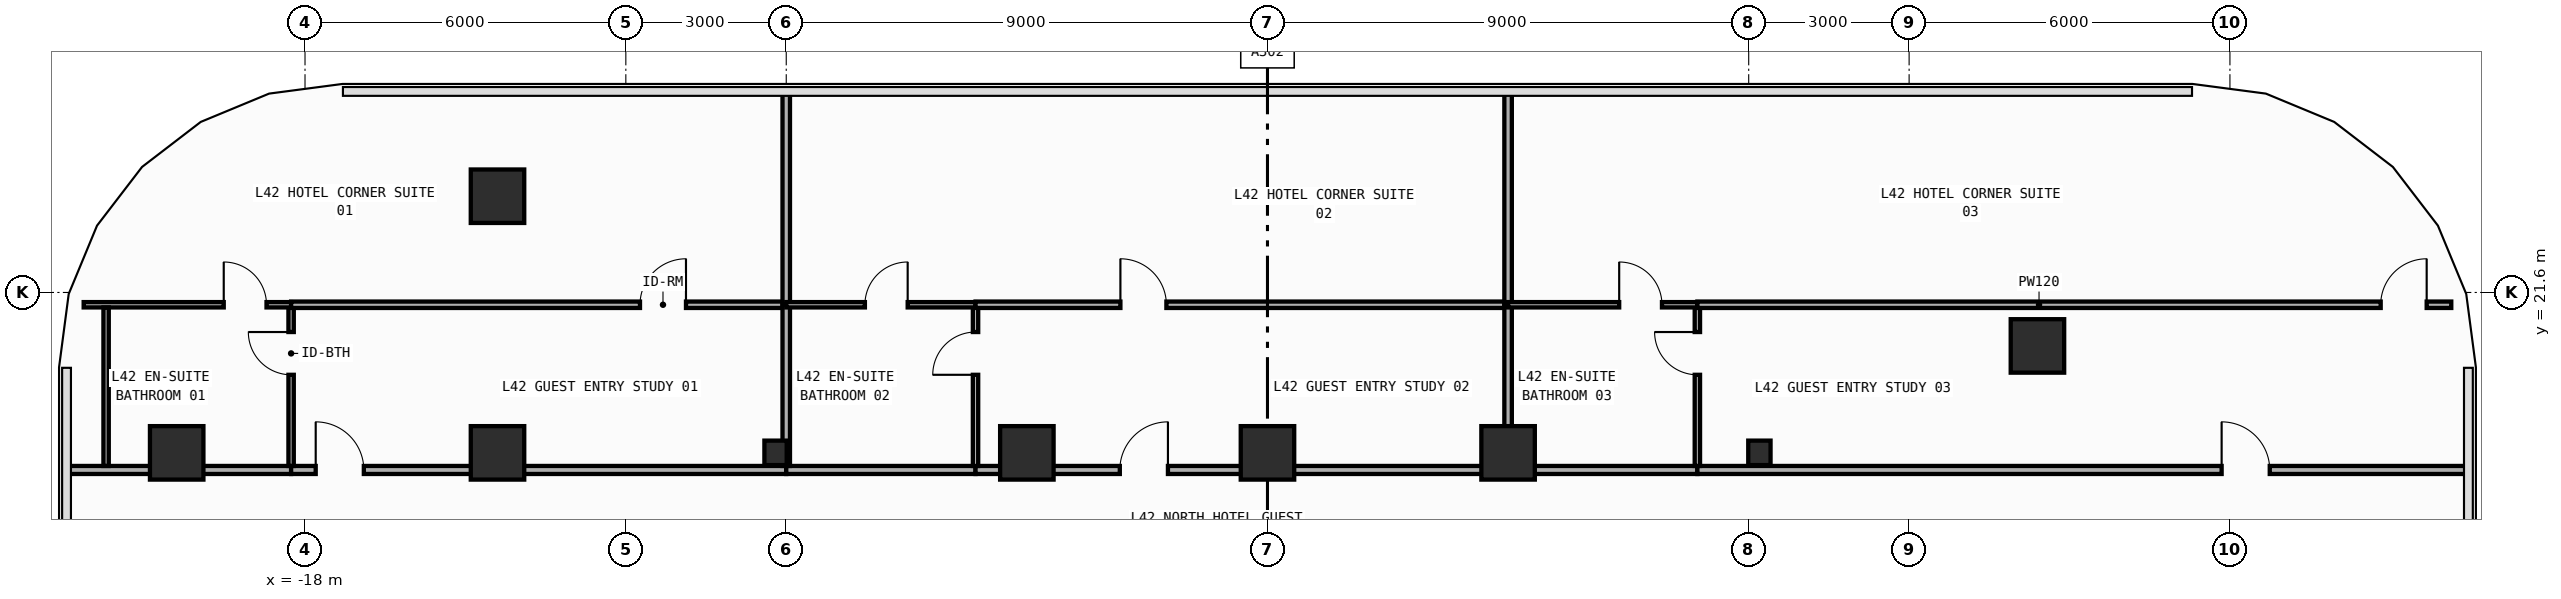
"""IFC4 building model, lengths in metres.
Left out: names, types, materials, properties, quantities, classifications, styles, units other than length and angle.
Written with IfcOpenShell. Run it as: python <this file> out.ifc"""

import sys

from ifc_helpers import new_model, si_unit, direction, frame, frame_2d, origin, origin_2d, place, context, subcontext, project, spatial, rectangle, i_section, extrude, element, fill, save


model = new_model("IFC4")
c1 = context("Model", 3, precision=1e-05, world=origin(), true_north=direction((0.0, 1.0)))
c2 = subcontext(c1, "Body", "Model", "MODEL_VIEW")
j1 = project(units=[si_unit("LENGTHUNIT", "METRE"), si_unit("PLANEANGLEUNIT", "RADIAN")], contexts=[c1])
p1 = place(None, origin())
s1 = spatial("IfcSite", under=j1, at=p1, CompositionType="ELEMENT")
p2 = place(p1, origin())
s2 = spatial("IfcBuilding", under=s1, at=p2, CompositionType="ELEMENT")
p3 = place(p2, frame((0.0, 0.0, 184.0)))
s3 = spatial("IfcBuildingStorey", under=s2, at=p3, CompositionType="ELEMENT", Elevation=184.0)
for number, where, z_axis, x_axis in (
    (1, (-9.2, 18.6, 0.0), (0.0, 0.0, 1.0), (1.0, 0.0, 0.0)),
    (2, (9.2, 18.6, 0.0), (0.0, 0.0, 1.0), (1.0, 0.0, 0.0)),
):
    element("IfcColumn", number, at=place(p3, frame(where, z_axis=z_axis, x_axis=x_axis)), inside=s3, PredefinedType="COLUMN", context=c2, shape_type="SweptSolid", body=[
        extrude(i_section(OverallWidth=0.417, OverallDepth=0.458, WebThickness=0.03, FlangeThickness=0.05, FilletRadius=0.022, at=origin_2d()), origin(), (0.0, 0.0, 1.0), 3.8),
    ])
for number, where, z_axis, x_axis in (
    (3, (-20.4, 18.6, 0.0), (0.0, 0.0, 1.0), (1.0, 0.0, 0.0)),
    (4, (-14.4, 18.6, 0.0), (0.0, 0.0, 1.0), (1.0, 0.0, 0.0)),
    (5, (-4.5, 18.6, 0.0), (0.0, 0.0, 1.0), (1.0, 0.0, 0.0)),
    (6, (0.0, 18.6, 0.0), (0.0, 0.0, 1.0), (1.0, 0.0, 0.0)),
    (7, (4.5, 18.6, 0.0), (0.0, 0.0, 1.0), (1.0, 0.0, 0.0)),
    (8, (-14.4, 23.4, 0.0), (0.0, 0.0, 1.0), (1.0, 0.0, 0.0)),
    (9, (14.4, 20.6, 0.0), (0.0, 0.0, 1.0), (1.0, 0.0, 0.0)),
):
    element("IfcColumn", number, at=place(p3, frame(where, z_axis=z_axis, x_axis=x_axis)), inside=s3, PredefinedType="COLUMN", context=c2, shape_type="SweptSolid", body=[
        extrude(rectangle(XDim=1.0, YDim=1.0, at=origin_2d()), origin(), (0.0, 0.0, 1.0), 3.8),
    ])
p4 = place(p3, frame((-22.455, 18.28, 0.0), z_axis=(0.0, 0.0, 1.0), x_axis=(1.0, 0.0, 0.0)))
e10 = element("IfcWall", 10, at=p4, inside=s3, PredefinedType="PARTITIONING", context=c2, shape_type="SweptSolid", body=[
    extrude(rectangle(XDim=4.195, YDim=0.15, at=frame_2d((2.098, 0.0))), origin(), (0.0, 0.0, 1.0), 2.952),
])
p5 = place(p3, frame((-18.26, 18.28, 0.0), z_axis=(0.0, 0.0, 1.0), x_axis=(1.0, 0.0, 0.0)))
e11 = element("IfcWall", 11, at=p5, inside=s3, PredefinedType="PARTITIONING", context=c2, shape_type="SweptSolid", body=[
    extrude(rectangle(XDim=9.26, YDim=0.15, at=frame_2d((4.63, 0.0))), origin(), (0.0, 0.0, 1.0), 2.952),
])
p6 = place(p5, frame((0.46, 0.0, 0.0)))
e12 = element("IfcOpeningElement", 12, at=p6, cuts=e11, PredefinedType="OPENING", context=c2, shape_type="SweptSolid", body=[
    extrude(rectangle(XDim=0.9, YDim=2.15, at=frame_2d((0.45, 1.075))), frame((0.0, 0.085, 0.0), z_axis=(0.0, -1.0, 0.0), x_axis=(1.0, 0.0, 0.0)), (0.0, 0.0, 1.0), 0.17),
])
p7 = place(p3, frame((-9.0, 18.28, 0.0), z_axis=(0.0, 0.0, 1.0), x_axis=(1.0, 0.0, 0.0)))
e13 = element("IfcWall", 13, at=p7, inside=s3, PredefinedType="PARTITIONING", context=c2, shape_type="SweptSolid", body=[
    extrude(rectangle(XDim=3.54, YDim=0.15, at=frame_2d((1.77, 0.0))), origin(), (0.0, 0.0, 1.0), 2.952),
])
p8 = place(p3, frame((-5.46, 18.28, 0.0), z_axis=(0.0, 0.0, 1.0), x_axis=(1.0, 0.0, 0.0)))
e14 = element("IfcWall", 14, at=p8, inside=s3, PredefinedType="PARTITIONING", context=c2, shape_type="SweptSolid", body=[
    extrude(rectangle(XDim=9.96, YDim=0.15, at=frame_2d((4.98, 0.0))), origin(), (0.0, 0.0, 1.0), 2.952),
])
p9 = place(p8, frame((2.698, 0.0, 0.0)))
e15 = element("IfcOpeningElement", 15, at=p9, cuts=e14, PredefinedType="OPENING", context=c2, shape_type="SweptSolid", body=[
    extrude(rectangle(XDim=0.9, YDim=2.15, at=frame_2d((0.45, 1.075))), frame((0.0, 0.085, 0.0), z_axis=(0.0, -1.0, 0.0), x_axis=(1.0, 0.0, 0.0)), (0.0, 0.0, 1.0), 0.17),
])
p10 = place(p3, frame((4.5, 18.28, 0.0), z_axis=(0.0, 0.0, 1.0), x_axis=(1.0, 0.0, 0.0)))
e16 = element("IfcWall", 16, at=p10, inside=s3, PredefinedType="PARTITIONING", context=c2, shape_type="SweptSolid", body=[
    extrude(rectangle(XDim=3.54, YDim=0.15, at=frame_2d((1.77, 0.0))), origin(), (0.0, 0.0, 1.0), 2.952),
])
p11 = place(p3, frame((8.04, 18.28, 0.0), z_axis=(0.0, 0.0, 1.0), x_axis=(1.0, 0.0, 0.0)))
e17 = element("IfcWall", 17, at=p11, inside=s3, PredefinedType="PARTITIONING", context=c2, shape_type="SweptSolid", body=[
    extrude(rectangle(XDim=14.415, YDim=0.15, at=frame_2d((7.208, 0.0))), origin(), (0.0, 0.0, 1.0), 2.952),
])
p12 = place(p11, frame((9.805, 0.0, 0.0)))
e18 = element("IfcOpeningElement", 18, at=p12, cuts=e17, PredefinedType="OPENING", context=c2, shape_type="SweptSolid", body=[
    extrude(rectangle(XDim=0.9, YDim=2.15, at=frame_2d((0.45, 1.075))), frame((0.0, 0.085, 0.0), z_axis=(0.0, -1.0, 0.0), x_axis=(1.0, 0.0, 0.0)), (0.0, 0.0, 1.0), 0.17),
])
p13 = place(p3, frame((-18.26, 18.355, 0.0), z_axis=(0.0, 0.0, 1.0), x_axis=(0.0, 1.0, 0.0)))
e19 = element("IfcWall", 19, at=p13, inside=s3, PredefinedType="PARTITIONING", context=c2, shape_type="SweptSolid", body=[
    extrude(rectangle(XDim=2.965, YDim=0.1, at=frame_2d((1.482, 0.0))), origin(), (0.0, 0.0, 1.0), 3.54),
])
p14 = place(p13, frame((1.705, 0.0, 0.0)))
e20 = element("IfcOpeningElement", 20, at=p14, cuts=e19, PredefinedType="OPENING", context=c2, shape_type="SweptSolid", body=[
    extrude(rectangle(XDim=0.8, YDim=2.1, at=frame_2d((0.4, 1.05))), frame((0.0, 0.06, 0.0), z_axis=(0.0, -1.0, 0.0), x_axis=(1.0, 0.0, 0.0)), (0.0, 0.0, 1.0), 0.12),
])
p15 = place(p3, frame((-22.14, 21.37, 0.0), z_axis=(0.0, 0.0, 1.0), x_axis=(1.0, 0.0, 0.0)))
e21 = element("IfcWall", 21, at=p15, inside=s3, PredefinedType="PARTITIONING", context=c2, shape_type="SweptSolid", body=[
    extrude(rectangle(XDim=3.88, YDim=0.1, at=frame_2d((1.94, 0.0))), origin(), (0.0, 0.0, 1.0), 3.54),
])
p16 = place(p15, frame((2.62, 0.0, 0.0)))
e22 = element("IfcOpeningElement", 22, at=p16, cuts=e21, PredefinedType="OPENING", context=c2, shape_type="SweptSolid", body=[
    extrude(rectangle(XDim=0.8, YDim=2.1, at=frame_2d((0.4, 1.05))), frame((0.0, 0.06, 0.0), z_axis=(0.0, -1.0, 0.0), x_axis=(1.0, 0.0, 0.0)), (0.0, 0.0, 1.0), 0.12),
])
p17 = place(p3, frame((-18.26, 21.37, 0.0), z_axis=(0.0, 0.0, 1.0), x_axis=(1.0, 0.0, 0.0)))
e23 = element("IfcWall", 23, at=p17, inside=s3, PredefinedType="PARTITIONING", context=c2, shape_type="SweptSolid", body=[
    extrude(rectangle(XDim=9.26, YDim=0.12, at=frame_2d((4.63, 0.0))), origin(), (0.0, 0.0, 1.0), 3.54),
])
p18 = place(p17, frame((6.525, 0.0, 0.0)))
e24 = element("IfcOpeningElement", 24, at=p18, cuts=e23, PredefinedType="OPENING", context=c2, shape_type="SweptSolid", body=[
    extrude(rectangle(XDim=0.86, YDim=2.15, at=frame_2d((0.43, 1.075))), frame((0.0, 0.07, 0.0), z_axis=(0.0, -1.0, 0.0), x_axis=(1.0, 0.0, 0.0)), (0.0, 0.0, 1.0), 0.14),
])
p19 = place(p3, frame((-9.0, 18.355, 0.0), z_axis=(0.0, 0.0, 1.0), x_axis=(0.0, 1.0, 0.0)))
e25 = element("IfcWall", 25, at=p19, inside=s3, PredefinedType="PARTITIONING", context=c2, shape_type="SweptSolid", body=[
    extrude(rectangle(XDim=3.015, YDim=0.14, at=frame_2d((1.508, 0.0))), origin(), (0.0, 0.0, 1.0), 2.952),
])
p20 = place(p3, frame((-9.0, 21.37, 0.0), z_axis=(0.0, 0.0, 1.0), x_axis=(0.0, 1.0, 0.0)))
e26 = element("IfcWall", 26, at=p20, inside=s3, PredefinedType="PARTITIONING", context=c2, shape_type="SweptSolid", body=[
    extrude(rectangle(XDim=3.985, YDim=0.14, at=frame_2d((1.992, 0.0))), origin(), (0.0, 0.0, 1.0), 3.54),
])
p21 = place(p3, frame((-5.46, 18.355, 0.0), z_axis=(0.0, 0.0, 1.0), x_axis=(0.0, 1.0, 0.0)))
e27 = element("IfcWall", 27, at=p21, inside=s3, PredefinedType="PARTITIONING", context=c2, shape_type="SweptSolid", body=[
    extrude(rectangle(XDim=2.965, YDim=0.1, at=frame_2d((1.482, 0.0))), origin(), (0.0, 0.0, 1.0), 3.54),
])
p22 = place(p21, frame((1.705, 0.0, 0.0)))
e28 = element("IfcOpeningElement", 28, at=p22, cuts=e27, PredefinedType="OPENING", context=c2, shape_type="SweptSolid", body=[
    extrude(rectangle(XDim=0.8, YDim=2.1, at=frame_2d((0.4, 1.05))), frame((0.0, 0.06, 0.0), z_axis=(0.0, -1.0, 0.0), x_axis=(1.0, 0.0, 0.0)), (0.0, 0.0, 1.0), 0.12),
])
p23 = place(p3, frame((-9.0, 21.37, 0.0), z_axis=(0.0, 0.0, 1.0), x_axis=(1.0, 0.0, 0.0)))
e29 = element("IfcWall", 29, at=p23, inside=s3, PredefinedType="PARTITIONING", context=c2, shape_type="SweptSolid", body=[
    extrude(rectangle(XDim=3.54, YDim=0.1, at=frame_2d((1.77, 0.0))), origin(), (0.0, 0.0, 1.0), 3.54),
])
p24 = place(p23, frame((1.471, 0.0, 0.0)))
e30 = element("IfcOpeningElement", 30, at=p24, cuts=e29, PredefinedType="OPENING", context=c2, shape_type="SweptSolid", body=[
    extrude(rectangle(XDim=0.8, YDim=2.1, at=frame_2d((0.4, 1.05))), frame((0.0, 0.06, 0.0), z_axis=(0.0, -1.0, 0.0), x_axis=(1.0, 0.0, 0.0)), (0.0, 0.0, 1.0), 0.12),
])
p25 = place(p3, frame((-5.46, 21.37, 0.0), z_axis=(0.0, 0.0, 1.0), x_axis=(1.0, 0.0, 0.0)))
e31 = element("IfcWall", 31, at=p25, inside=s3, PredefinedType="PARTITIONING", context=c2, shape_type="SweptSolid", body=[
    extrude(rectangle(XDim=9.96, YDim=0.12, at=frame_2d((4.98, 0.0))), origin(), (0.0, 0.0, 1.0), 3.54),
])
p26 = place(p25, frame((2.709, 0.0, 0.0)))
e32 = element("IfcOpeningElement", 32, at=p26, cuts=e31, PredefinedType="OPENING", context=c2, shape_type="SweptSolid", body=[
    extrude(rectangle(XDim=0.86, YDim=2.15, at=frame_2d((0.43, 1.075))), frame((0.0, 0.07, 0.0), z_axis=(0.0, -1.0, 0.0), x_axis=(1.0, 0.0, 0.0)), (0.0, 0.0, 1.0), 0.14),
])
p27 = place(p3, frame((4.5, 18.355, 0.0), z_axis=(0.0, 0.0, 1.0), x_axis=(0.0, 1.0, 0.0)))
e33 = element("IfcWall", 33, at=p27, inside=s3, PredefinedType="PARTITIONING", context=c2, shape_type="SweptSolid", body=[
    extrude(rectangle(XDim=3.015, YDim=0.14, at=frame_2d((1.508, 0.0))), origin(), (0.0, 0.0, 1.0), 3.54),
])
p28 = place(p3, frame((4.5, 21.37, 0.0), z_axis=(0.0, 0.0, 1.0), x_axis=(0.0, 1.0, 0.0)))
e34 = element("IfcWall", 34, at=p28, inside=s3, PredefinedType="PARTITIONING", context=c2, shape_type="SweptSolid", body=[
    extrude(rectangle(XDim=3.985, YDim=0.14, at=frame_2d((1.992, 0.0))), origin(), (0.0, 0.0, 1.0), 3.54),
])
p29 = place(p3, frame((8.04, 18.355, 0.0), z_axis=(0.0, 0.0, 1.0), x_axis=(0.0, 1.0, 0.0)))
e35 = element("IfcWall", 35, at=p29, inside=s3, PredefinedType="PARTITIONING", context=c2, shape_type="SweptSolid", body=[
    extrude(rectangle(XDim=2.965, YDim=0.1, at=frame_2d((1.482, 0.0))), origin(), (0.0, 0.0, 1.0), 3.54),
])
p30 = place(p29, frame((1.705, 0.0, 0.0)))
e36 = element("IfcOpeningElement", 36, at=p30, cuts=e35, PredefinedType="OPENING", context=c2, shape_type="SweptSolid", body=[
    extrude(rectangle(XDim=0.8, YDim=2.1, at=frame_2d((0.4, 1.05))), frame((0.0, 0.06, 0.0), z_axis=(0.0, -1.0, 0.0), x_axis=(1.0, 0.0, 0.0)), (0.0, 0.0, 1.0), 0.12),
])
p31 = place(p3, frame((4.5, 21.37, 0.0), z_axis=(0.0, 0.0, 1.0), x_axis=(1.0, 0.0, 0.0)))
e37 = element("IfcWall", 37, at=p31, inside=s3, PredefinedType="PARTITIONING", context=c2, shape_type="SweptSolid", body=[
    extrude(rectangle(XDim=3.54, YDim=0.1, at=frame_2d((1.77, 0.0))), origin(), (0.0, 0.0, 1.0), 3.54),
])
p32 = place(p31, frame((2.078, 0.0, 0.0)))
e38 = element("IfcOpeningElement", 38, at=p32, cuts=e37, PredefinedType="OPENING", context=c2, shape_type="SweptSolid", body=[
    extrude(rectangle(XDim=0.8, YDim=2.1, at=frame_2d((0.4, 1.05))), frame((0.0, 0.06, 0.0), z_axis=(0.0, -1.0, 0.0), x_axis=(1.0, 0.0, 0.0)), (0.0, 0.0, 1.0), 0.12),
])
p33 = place(p3, frame((8.04, 21.37, 0.0), z_axis=(0.0, 0.0, 1.0), x_axis=(1.0, 0.0, 0.0)))
e39 = element("IfcWall", 39, at=p33, inside=s3, PredefinedType="PARTITIONING", context=c2, shape_type="SweptSolid", body=[
    extrude(rectangle(XDim=14.1, YDim=0.12, at=frame_2d((7.05, 0.0))), origin(), (0.0, 0.0, 1.0), 3.54),
])
p34 = place(p33, frame((12.78, 0.0, 0.0)))
e40 = element("IfcOpeningElement", 40, at=p34, cuts=e39, PredefinedType="OPENING", context=c2, shape_type="SweptSolid", body=[
    extrude(rectangle(XDim=0.86, YDim=2.15, at=frame_2d((0.43, 1.075))), frame((0.0, 0.07, 0.0), z_axis=(0.0, -1.0, 0.0), x_axis=(1.0, 0.0, 0.0)), (0.0, 0.0, 1.0), 0.14),
])
p35 = place(p3, frame((-21.72, 18.355, 0.0), z_axis=(0.0, 0.0, 1.0), x_axis=(0.0, 1.0, 0.0)))
e41 = element("IfcWall", 41, at=p35, inside=s3, PredefinedType="PARTITIONING", context=c2, shape_type="SweptSolid", body=[
    extrude(rectangle(XDim=2.965, YDim=0.1, at=frame_2d((1.482, 0.0))), origin(), (0.0, 0.0, 1.0), 3.54),
])
p36 = place(p6, origin())
e42 = element("IfcDoor", 42, at=p36, inside=s3, OperationType="SINGLE_SWING_LEFT", PredefinedType="DOOR", context=c2, shape_type="SweptSolid", body=[
    extrude(rectangle(XDim=0.9, YDim=2.15, at=frame_2d((0.45, 1.075))), frame((0.0, 0.025, 0.0), z_axis=(0.0, -1.0, 0.0), x_axis=(1.0, 0.0, 0.0)), (0.0, 0.0, 1.0), 0.05),
])
fill(e12, e42)
p37 = place(p9, origin())
e43 = element("IfcDoor", 43, at=p37, inside=s3, OperationType="SINGLE_SWING_RIGHT", PredefinedType="DOOR", context=c2, shape_type="SweptSolid", body=[
    extrude(rectangle(XDim=0.9, YDim=2.15, at=frame_2d((0.45, 1.075))), frame((0.0, 0.025, 0.0), z_axis=(0.0, -1.0, 0.0), x_axis=(1.0, 0.0, 0.0)), (0.0, 0.0, 1.0), 0.05),
])
fill(e15, e43)
p38 = place(p12, origin())
e44 = element("IfcDoor", 44, at=p38, inside=s3, OperationType="SINGLE_SWING_LEFT", PredefinedType="DOOR", context=c2, shape_type="SweptSolid", body=[
    extrude(rectangle(XDim=0.9, YDim=2.15, at=frame_2d((0.45, 1.075))), frame((0.0, 0.025, 0.0), z_axis=(0.0, -1.0, 0.0), x_axis=(1.0, 0.0, 0.0)), (0.0, 0.0, 1.0), 0.05),
])
fill(e18, e44)
p39 = place(p14, origin())
e45 = element("IfcDoor", 45, at=p39, inside=s3, OperationType="SINGLE_SWING_RIGHT", PredefinedType="DOOR", context=c2, shape_type="SweptSolid", body=[
    extrude(rectangle(XDim=0.8, YDim=2.1, at=frame_2d((0.4, 1.05))), frame((0.0, 0.025, 0.0), z_axis=(0.0, -1.0, 0.0), x_axis=(1.0, 0.0, 0.0)), (0.0, 0.0, 1.0), 0.05),
])
fill(e20, e45)
p40 = place(p16, origin())
e46 = element("IfcDoor", 46, at=p40, inside=s3, OperationType="SINGLE_SWING_LEFT", PredefinedType="DOOR", context=c2, shape_type="SweptSolid", body=[
    extrude(rectangle(XDim=0.8, YDim=2.1, at=frame_2d((0.4, 1.05))), frame((0.0, 0.025, 0.0), z_axis=(0.0, -1.0, 0.0), x_axis=(1.0, 0.0, 0.0)), (0.0, 0.0, 1.0), 0.05),
])
fill(e22, e46)
p41 = place(p18, origin())
e47 = element("IfcDoor", 47, at=p41, inside=s3, OperationType="SINGLE_SWING_RIGHT", PredefinedType="DOOR", context=c2, shape_type="SweptSolid", body=[
    extrude(rectangle(XDim=0.86, YDim=2.15, at=frame_2d((0.43, 1.075))), frame((0.0, 0.025, 0.0), z_axis=(0.0, -1.0, 0.0), x_axis=(1.0, 0.0, 0.0)), (0.0, 0.0, 1.0), 0.05),
])
fill(e24, e47)
p42 = place(p22, origin())
e48 = element("IfcDoor", 48, at=p42, inside=s3, OperationType="SINGLE_SWING_LEFT", PredefinedType="DOOR", context=c2, shape_type="SweptSolid", body=[
    extrude(rectangle(XDim=0.8, YDim=2.1, at=frame_2d((0.4, 1.05))), frame((0.0, 0.025, 0.0), z_axis=(0.0, -1.0, 0.0), x_axis=(1.0, 0.0, 0.0)), (0.0, 0.0, 1.0), 0.05),
])
fill(e28, e48)
p43 = place(p24, origin())
e49 = element("IfcDoor", 49, at=p43, inside=s3, OperationType="SINGLE_SWING_RIGHT", PredefinedType="DOOR", context=c2, shape_type="SweptSolid", body=[
    extrude(rectangle(XDim=0.8, YDim=2.1, at=frame_2d((0.4, 1.05))), frame((0.0, 0.025, 0.0), z_axis=(0.0, -1.0, 0.0), x_axis=(1.0, 0.0, 0.0)), (0.0, 0.0, 1.0), 0.05),
])
fill(e30, e49)
p44 = place(p26, origin())
e50 = element("IfcDoor", 50, at=p44, inside=s3, OperationType="SINGLE_SWING_LEFT", PredefinedType="DOOR", context=c2, shape_type="SweptSolid", body=[
    extrude(rectangle(XDim=0.86, YDim=2.15, at=frame_2d((0.43, 1.075))), frame((0.0, 0.025, 0.0), z_axis=(0.0, -1.0, 0.0), x_axis=(1.0, 0.0, 0.0)), (0.0, 0.0, 1.0), 0.05),
])
fill(e32, e50)
p45 = place(p30, origin())
e51 = element("IfcDoor", 51, at=p45, inside=s3, OperationType="SINGLE_SWING_RIGHT", PredefinedType="DOOR", context=c2, shape_type="SweptSolid", body=[
    extrude(rectangle(XDim=0.8, YDim=2.1, at=frame_2d((0.4, 1.05))), frame((0.0, 0.025, 0.0), z_axis=(0.0, -1.0, 0.0), x_axis=(1.0, 0.0, 0.0)), (0.0, 0.0, 1.0), 0.05),
])
fill(e36, e51)
p46 = place(p32, origin())
e52 = element("IfcDoor", 52, at=p46, inside=s3, OperationType="SINGLE_SWING_LEFT", PredefinedType="DOOR", context=c2, shape_type="SweptSolid", body=[
    extrude(rectangle(XDim=0.8, YDim=2.1, at=frame_2d((0.4, 1.05))), frame((0.0, 0.025, 0.0), z_axis=(0.0, -1.0, 0.0), x_axis=(1.0, 0.0, 0.0)), (0.0, 0.0, 1.0), 0.05),
])
fill(e38, e52)
p47 = place(p34, origin())
e53 = element("IfcDoor", 53, at=p47, inside=s3, OperationType="SINGLE_SWING_RIGHT", PredefinedType="DOOR", context=c2, shape_type="SweptSolid", body=[
    extrude(rectangle(XDim=0.86, YDim=2.15, at=frame_2d((0.43, 1.075))), frame((0.0, 0.025, 0.0), z_axis=(0.0, -1.0, 0.0), x_axis=(1.0, 0.0, 0.0)), (0.0, 0.0, 1.0), 0.05),
])
fill(e40, e53)
save(model, sys.argv[1])
